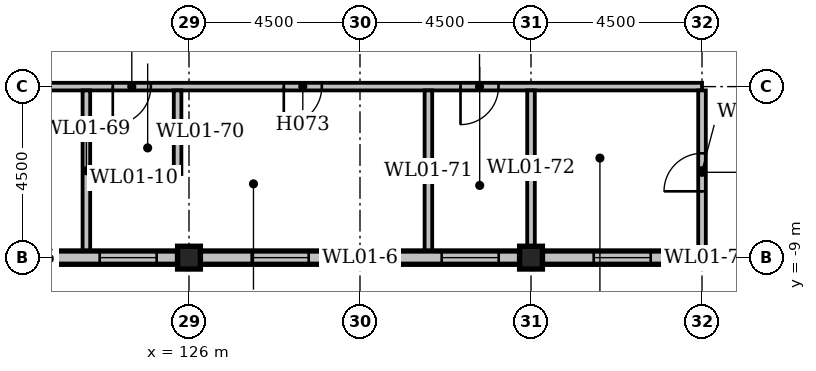
"""IFC4 building model, lengths in metres.
Left out: names, types, materials, properties, quantities, classifications, styles, units other than length and angle.
Written with IfcOpenShell. Run it as: python <this file> out.ifc"""

import sys

from ifc_helpers import new_model, si_unit, direction, frame, frame_2d, origin, origin_2d, place, context, subcontext, project, spatial, rectangle, extrude, element, fill, save


model = new_model("IFC4")
c1 = context("Model", 3, precision=1e-05, world=origin(), true_north=direction((0.0, 1.0)))
c2 = subcontext(c1, "Body", "Model", "MODEL_VIEW")
j1 = project(units=[si_unit("LENGTHUNIT", "METRE"), si_unit("PLANEANGLEUNIT", "RADIAN")], contexts=[c1])
p1 = place(None, origin())
s1 = spatial("IfcSite", under=j1, at=p1, CompositionType="ELEMENT")
p2 = place(p1, origin())
s2 = spatial("IfcBuilding", under=s1, at=p2, CompositionType="ELEMENT")
p3 = place(p2, frame((0.0, 0.0, 9.0)))
s3 = spatial("IfcBuildingStorey", under=s2, at=p3, CompositionType="ELEMENT", Elevation=9.0)
for number, where, z_axis, x_axis in (
    (1, (126.0, -9.0, 0.0), (0.0, 0.0, 1.0), (1.0, 0.0, 0.0)),
    (2, (135.0, -9.0, 0.0), (0.0, 0.0, 1.0), (1.0, 0.0, 0.0)),
):
    element("IfcColumn", number, at=place(p3, frame(where, z_axis=z_axis, x_axis=x_axis)), inside=s3, PredefinedType="COLUMN", context=c2, shape_type="SweptSolid", body=[
        extrude(rectangle(XDim=0.6, YDim=0.6, at=origin_2d()), origin(), (0.0, 0.0, 1.0), 4.7),
    ])
p4 = place(p3, frame((117.3, -9.0, 0.0), z_axis=(0.0, 0.0, 1.0), x_axis=(1.0, 0.0, 0.0)))
e3 = element("IfcWall", 3, at=p4, inside=s3, PredefinedType="STANDARD", context=c2, shape_type="SweptSolid", body=[
    extrude(rectangle(XDim=8.4, YDim=0.35, at=frame_2d((4.2, 0.0))), origin(), (0.0, 0.0, 1.0), 4.1),
])
p5 = place(p4, frame((1.35, 0.0, 1.0)))
e4 = element("IfcOpeningElement", 4, at=p5, cuts=e3, PredefinedType="OPENING", context=c2, shape_type="SweptSolid", body=[
    extrude(rectangle(XDim=1.5, YDim=2.4, at=frame_2d((0.75, 1.2))), frame((0.0, 0.187, 0.0), z_axis=(0.0, -1.0, 0.0), x_axis=(1.0, 0.0, 0.0)), (0.0, 0.0, 1.0), 0.374),
])
p6 = place(p4, frame((6.35, 0.0, 1.0)))
e5 = element("IfcOpeningElement", 5, at=p6, cuts=e3, PredefinedType="OPENING", context=c2, shape_type="SweptSolid", body=[
    extrude(rectangle(XDim=1.5, YDim=2.4, at=frame_2d((0.75, 1.2))), frame((0.0, 0.187, 0.0), z_axis=(0.0, -1.0, 0.0), x_axis=(1.0, 0.0, 0.0)), (0.0, 0.0, 1.0), 0.374),
])
p7 = place(p3, frame((126.3, -9.0, 0.0), z_axis=(0.0, 0.0, 1.0), x_axis=(1.0, 0.0, 0.0)))
e6 = element("IfcWall", 6, at=p7, inside=s3, PredefinedType="STANDARD", context=c2, shape_type="SweptSolid", body=[
    extrude(rectangle(XDim=8.4, YDim=0.35, at=frame_2d((4.2, 0.0))), origin(), (0.0, 0.0, 1.0), 4.1),
])
p8 = place(p7, frame((1.35, 0.0, 1.0)))
e7 = element("IfcOpeningElement", 7, at=p8, cuts=e6, PredefinedType="OPENING", context=c2, shape_type="SweptSolid", body=[
    extrude(rectangle(XDim=1.5, YDim=2.4, at=frame_2d((0.75, 1.2))), frame((0.0, 0.187, 0.0), z_axis=(0.0, -1.0, 0.0), x_axis=(1.0, 0.0, 0.0)), (0.0, 0.0, 1.0), 0.374),
])
p9 = place(p7, frame((6.35, 0.0, 1.0)))
e8 = element("IfcOpeningElement", 8, at=p9, cuts=e6, PredefinedType="OPENING", context=c2, shape_type="SweptSolid", body=[
    extrude(rectangle(XDim=1.5, YDim=2.4, at=frame_2d((0.75, 1.2))), frame((0.0, 0.187, 0.0), z_axis=(0.0, -1.0, 0.0), x_axis=(1.0, 0.0, 0.0)), (0.0, 0.0, 1.0), 0.374),
])
p10 = place(p3, frame((135.3, -9.0, 0.0), z_axis=(0.0, 0.0, 1.0), x_axis=(1.0, 0.0, 0.0)))
e9 = element("IfcWall", 9, at=p10, inside=s3, PredefinedType="STANDARD", context=c2, shape_type="SweptSolid", body=[
    extrude(rectangle(XDim=8.4, YDim=0.35, at=frame_2d((4.2, 0.0))), origin(), (0.0, 0.0, 1.0), 4.1),
])
p11 = place(p10, frame((1.35, 0.0, 1.0)))
e10 = element("IfcOpeningElement", 10, at=p11, cuts=e9, PredefinedType="OPENING", context=c2, shape_type="SweptSolid", body=[
    extrude(rectangle(XDim=1.5, YDim=2.4, at=frame_2d((0.75, 1.2))), frame((0.0, 0.187, 0.0), z_axis=(0.0, -1.0, 0.0), x_axis=(1.0, 0.0, 0.0)), (0.0, 0.0, 1.0), 0.374),
])
p12 = place(p3, frame((123.4, -6.9, 0.0), z_axis=(0.0, 0.0, 1.0), x_axis=(1.0, 0.0, 0.0)))
e11 = element("IfcWall", 11, at=p12, inside=s3, PredefinedType="STANDARD", context=c2, shape_type="SweptSolid", body=[
    extrude(rectangle(XDim=2.3, YDim=0.2, at=frame_2d((1.15, 0.0))), origin(), (0.0, 0.0, 1.0), 4.7),
])
p13 = place(p3, frame((94.625, -4.5, 0.0), z_axis=(0.0, 0.0, 1.0), x_axis=(1.0, 0.0, 0.0)))
e12 = element("IfcWall", 12, at=p13, inside=s3, PredefinedType="STANDARD", context=c2, shape_type="SweptSolid", body=[
    extrude(rectangle(XDim=44.875, YDim=0.2, at=frame_2d((22.438, 0.0))), origin(), (0.0, 0.0, 1.0), 4.7),
])
p14 = place(p13, frame((3.42, 0.0, 0.0)))
e13 = element("IfcOpeningElement", 13, at=p14, cuts=e12, PredefinedType="OPENING", context=c2, shape_type="SweptSolid", body=[
    extrude(rectangle(XDim=1.0, YDim=2.1, at=frame_2d((0.5, 1.05))), frame((0.0, 0.112, 0.0), z_axis=(0.0, -1.0, 0.0), x_axis=(1.0, 0.0, 0.0)), (0.0, 0.0, 1.0), 0.224),
])
p15 = place(p13, frame((10.17, 0.0, 0.0)))
e14 = element("IfcOpeningElement", 14, at=p15, cuts=e12, PredefinedType="OPENING", context=c2, shape_type="SweptSolid", body=[
    extrude(rectangle(XDim=1.0, YDim=2.1, at=frame_2d((0.5, 1.05))), frame((0.0, 0.112, 0.0), z_axis=(0.0, -1.0, 0.0), x_axis=(1.0, 0.0, 0.0)), (0.0, 0.0, 1.0), 0.224),
])
p16 = place(p13, frame((17.17, 0.0, 0.0)))
e15 = element("IfcOpeningElement", 15, at=p16, cuts=e12, PredefinedType="OPENING", context=c2, shape_type="SweptSolid", body=[
    extrude(rectangle(XDim=1.0, YDim=2.1, at=frame_2d((0.5, 1.05))), frame((0.0, 0.112, 0.0), z_axis=(0.0, -1.0, 0.0), x_axis=(1.0, 0.0, 0.0)), (0.0, 0.0, 1.0), 0.224),
])
p17 = place(p13, frame((24.82, 0.0, 0.0)))
e16 = element("IfcOpeningElement", 16, at=p17, cuts=e12, PredefinedType="OPENING", context=c2, shape_type="SweptSolid", body=[
    extrude(rectangle(XDim=1.0, YDim=2.1, at=frame_2d((0.5, 1.05))), frame((0.0, 0.112, 0.0), z_axis=(0.0, -1.0, 0.0), x_axis=(1.0, 0.0, 0.0)), (0.0, 0.0, 1.0), 0.224),
])
p18 = place(p13, frame((29.37, 0.0, 0.0)))
e17 = element("IfcOpeningElement", 17, at=p18, cuts=e12, PredefinedType="OPENING", context=c2, shape_type="SweptSolid", body=[
    extrude(rectangle(XDim=1.0, YDim=2.1, at=frame_2d((0.5, 1.05))), frame((0.0, 0.112, 0.0), z_axis=(0.0, -1.0, 0.0), x_axis=(1.0, 0.0, 0.0)), (0.0, 0.0, 1.0), 0.224),
])
p19 = place(p13, frame((33.87, 0.0, 0.0)))
e18 = element("IfcOpeningElement", 18, at=p19, cuts=e12, PredefinedType="OPENING", context=c2, shape_type="SweptSolid", body=[
    extrude(rectangle(XDim=1.0, YDim=2.1, at=frame_2d((0.5, 1.05))), frame((0.0, 0.112, 0.0), z_axis=(0.0, -1.0, 0.0), x_axis=(1.0, 0.0, 0.0)), (0.0, 0.0, 1.0), 0.224),
])
p20 = place(p13, frame((38.52, 0.0, 0.0)))
e19 = element("IfcOpeningElement", 19, at=p20, cuts=e12, PredefinedType="OPENING", context=c2, shape_type="SweptSolid", body=[
    extrude(rectangle(XDim=1.0, YDim=2.1, at=frame_2d((0.5, 1.05))), frame((0.0, 0.112, 0.0), z_axis=(0.0, -1.0, 0.0), x_axis=(1.0, 0.0, 0.0)), (0.0, 0.0, 1.0), 0.224),
])
p21 = place(p3, frame((123.3, -8.825, 0.0), z_axis=(0.0, 0.0, 1.0), x_axis=(0.0, 1.0, 0.0)))
e20 = element("IfcWall", 20, at=p21, inside=s3, PredefinedType="STANDARD", context=c2, shape_type="SweptSolid", body=[
    extrude(rectangle(XDim=4.225, YDim=0.2, at=frame_2d((2.112, 0.0))), origin(), (0.0, 0.0, 1.0), 4.7),
])
p22 = place(p3, frame((125.7, -6.8, 0.0), z_axis=(0.0, 0.0, 1.0), x_axis=(0.0, 1.0, 0.0)))
e21 = element("IfcWall", 21, at=p22, inside=s3, PredefinedType="STANDARD", context=c2, shape_type="SweptSolid", body=[
    extrude(rectangle(XDim=2.2, YDim=0.2, at=frame_2d((1.1, 0.0))), origin(), (0.0, 0.0, 1.0), 4.7),
])
p23 = place(p3, frame((132.3, -8.825, 0.0), z_axis=(0.0, 0.0, 1.0), x_axis=(0.0, 1.0, 0.0)))
e22 = element("IfcWall", 22, at=p23, inside=s3, PredefinedType="STANDARD", context=c2, shape_type="SweptSolid", body=[
    extrude(rectangle(XDim=4.225, YDim=0.2, at=frame_2d((2.112, 0.0))), origin(), (0.0, 0.0, 1.0), 4.7),
])
p24 = place(p3, frame((135.0, -8.7, 0.0), z_axis=(0.0, 0.0, 1.0), x_axis=(0.0, 1.0, 0.0)))
e23 = element("IfcWall", 23, at=p24, inside=s3, PredefinedType="STANDARD", context=c2, shape_type="SweptSolid", body=[
    extrude(rectangle(XDim=4.1, YDim=0.2, at=frame_2d((2.05, 0.0))), origin(), (0.0, 0.0, 1.0), 4.7),
])
p25 = place(p3, frame((139.5, -8.825, 0.0), z_axis=(0.0, 0.0, 1.0), x_axis=(0.0, 1.0, 0.0)))
e24 = element("IfcWall", 24, at=p25, inside=s3, PredefinedType="STANDARD", context=c2, shape_type="SweptSolid", body=[
    extrude(rectangle(XDim=4.225, YDim=0.2, at=frame_2d((2.112, 0.0))), origin(), (0.0, 0.0, 1.0), 4.7),
])
p26 = place(p25, frame((1.57, 0.0, 0.0)))
e25 = element("IfcOpeningElement", 25, at=p26, cuts=e24, PredefinedType="OPENING", context=c2, shape_type="SweptSolid", body=[
    extrude(rectangle(XDim=1.0, YDim=2.1, at=frame_2d((0.5, 1.05))), frame((0.0, 0.112, 0.0), z_axis=(0.0, -1.0, 0.0), x_axis=(1.0, 0.0, 0.0)), (0.0, 0.0, 1.0), 0.224),
])
p27 = place(p26, origin())
e26 = element("IfcDoor", 26, at=p27, inside=s3, OperationType="SINGLE_SWING_LEFT", PredefinedType="DOOR", context=c2, shape_type="SweptSolid", body=[
    extrude(rectangle(XDim=1.0, YDim=2.1, at=frame_2d((0.5, 1.05))), frame((0.0, 0.025, 0.0), z_axis=(0.0, -1.0, 0.0), x_axis=(1.0, 0.0, 0.0)), (0.0, 0.0, 1.0), 0.05),
])
fill(e25, e26)
p28 = place(p18, frame((1.0, 0.0, 0.0), z_axis=(0.0, 0.0, 1.0), x_axis=(-1.0, 0.0, 0.0)))
e27 = element("IfcDoor", 27, at=p28, inside=s3, OperationType="SINGLE_SWING_RIGHT", PredefinedType="DOOR", context=c2, shape_type="SweptSolid", body=[
    extrude(rectangle(XDim=1.0, YDim=2.1, at=frame_2d((0.5, 1.05))), frame((0.0, 0.025, 0.0), z_axis=(0.0, -1.0, 0.0), x_axis=(1.0, 0.0, 0.0)), (0.0, 0.0, 1.0), 0.05),
])
fill(e17, e27)
p29 = place(p19, frame((1.0, 0.0, 0.0), z_axis=(0.0, 0.0, 1.0), x_axis=(-1.0, 0.0, 0.0)))
e28 = element("IfcDoor", 28, at=p29, inside=s3, OperationType="SINGLE_SWING_RIGHT", PredefinedType="DOOR", context=c2, shape_type="SweptSolid", body=[
    extrude(rectangle(XDim=1.0, YDim=2.1, at=frame_2d((0.5, 1.05))), frame((0.0, 0.025, 0.0), z_axis=(0.0, -1.0, 0.0), x_axis=(1.0, 0.0, 0.0)), (0.0, 0.0, 1.0), 0.05),
])
fill(e18, e28)
p30 = place(p20, frame((1.0, 0.0, 0.0), z_axis=(0.0, 0.0, 1.0), x_axis=(-1.0, 0.0, 0.0)))
e29 = element("IfcDoor", 29, at=p30, inside=s3, OperationType="SINGLE_SWING_RIGHT", PredefinedType="DOOR", context=c2, shape_type="SweptSolid", body=[
    extrude(rectangle(XDim=1.0, YDim=2.1, at=frame_2d((0.5, 1.05))), frame((0.0, 0.025, 0.0), z_axis=(0.0, -1.0, 0.0), x_axis=(1.0, 0.0, 0.0)), (0.0, 0.0, 1.0), 0.05),
])
fill(e19, e29)
p31 = place(p6, origin())
e30 = element("IfcWindow", 30, at=p31, inside=s3, PartitioningType="SINGLE_PANEL", PredefinedType="WINDOW", context=c2, shape_type="SweptSolid", body=[
    extrude(rectangle(XDim=1.5, YDim=2.4, at=frame_2d((0.75, 1.2))), frame((0.0, 0.03, 0.0), z_axis=(0.0, -1.0, 0.0), x_axis=(1.0, 0.0, 0.0)), (0.0, 0.0, 1.0), 0.06),
])
fill(e5, e30)
p32 = place(p8, origin())
e31 = element("IfcWindow", 31, at=p32, inside=s3, PartitioningType="SINGLE_PANEL", PredefinedType="WINDOW", context=c2, shape_type="SweptSolid", body=[
    extrude(rectangle(XDim=1.5, YDim=2.4, at=frame_2d((0.75, 1.2))), frame((0.0, 0.03, 0.0), z_axis=(0.0, -1.0, 0.0), x_axis=(1.0, 0.0, 0.0)), (0.0, 0.0, 1.0), 0.06),
])
fill(e7, e31)
p33 = place(p9, origin())
e32 = element("IfcWindow", 32, at=p33, inside=s3, PartitioningType="SINGLE_PANEL", PredefinedType="WINDOW", context=c2, shape_type="SweptSolid", body=[
    extrude(rectangle(XDim=1.5, YDim=2.4, at=frame_2d((0.75, 1.2))), frame((0.0, 0.03, 0.0), z_axis=(0.0, -1.0, 0.0), x_axis=(1.0, 0.0, 0.0)), (0.0, 0.0, 1.0), 0.06),
])
fill(e8, e32)
p34 = place(p11, origin())
e33 = element("IfcWindow", 33, at=p34, inside=s3, PartitioningType="SINGLE_PANEL", PredefinedType="WINDOW", context=c2, shape_type="SweptSolid", body=[
    extrude(rectangle(XDim=1.5, YDim=2.4, at=frame_2d((0.75, 1.2))), frame((0.0, 0.03, 0.0), z_axis=(0.0, -1.0, 0.0), x_axis=(1.0, 0.0, 0.0)), (0.0, 0.0, 1.0), 0.06),
])
fill(e10, e33)
save(model, sys.argv[1])
